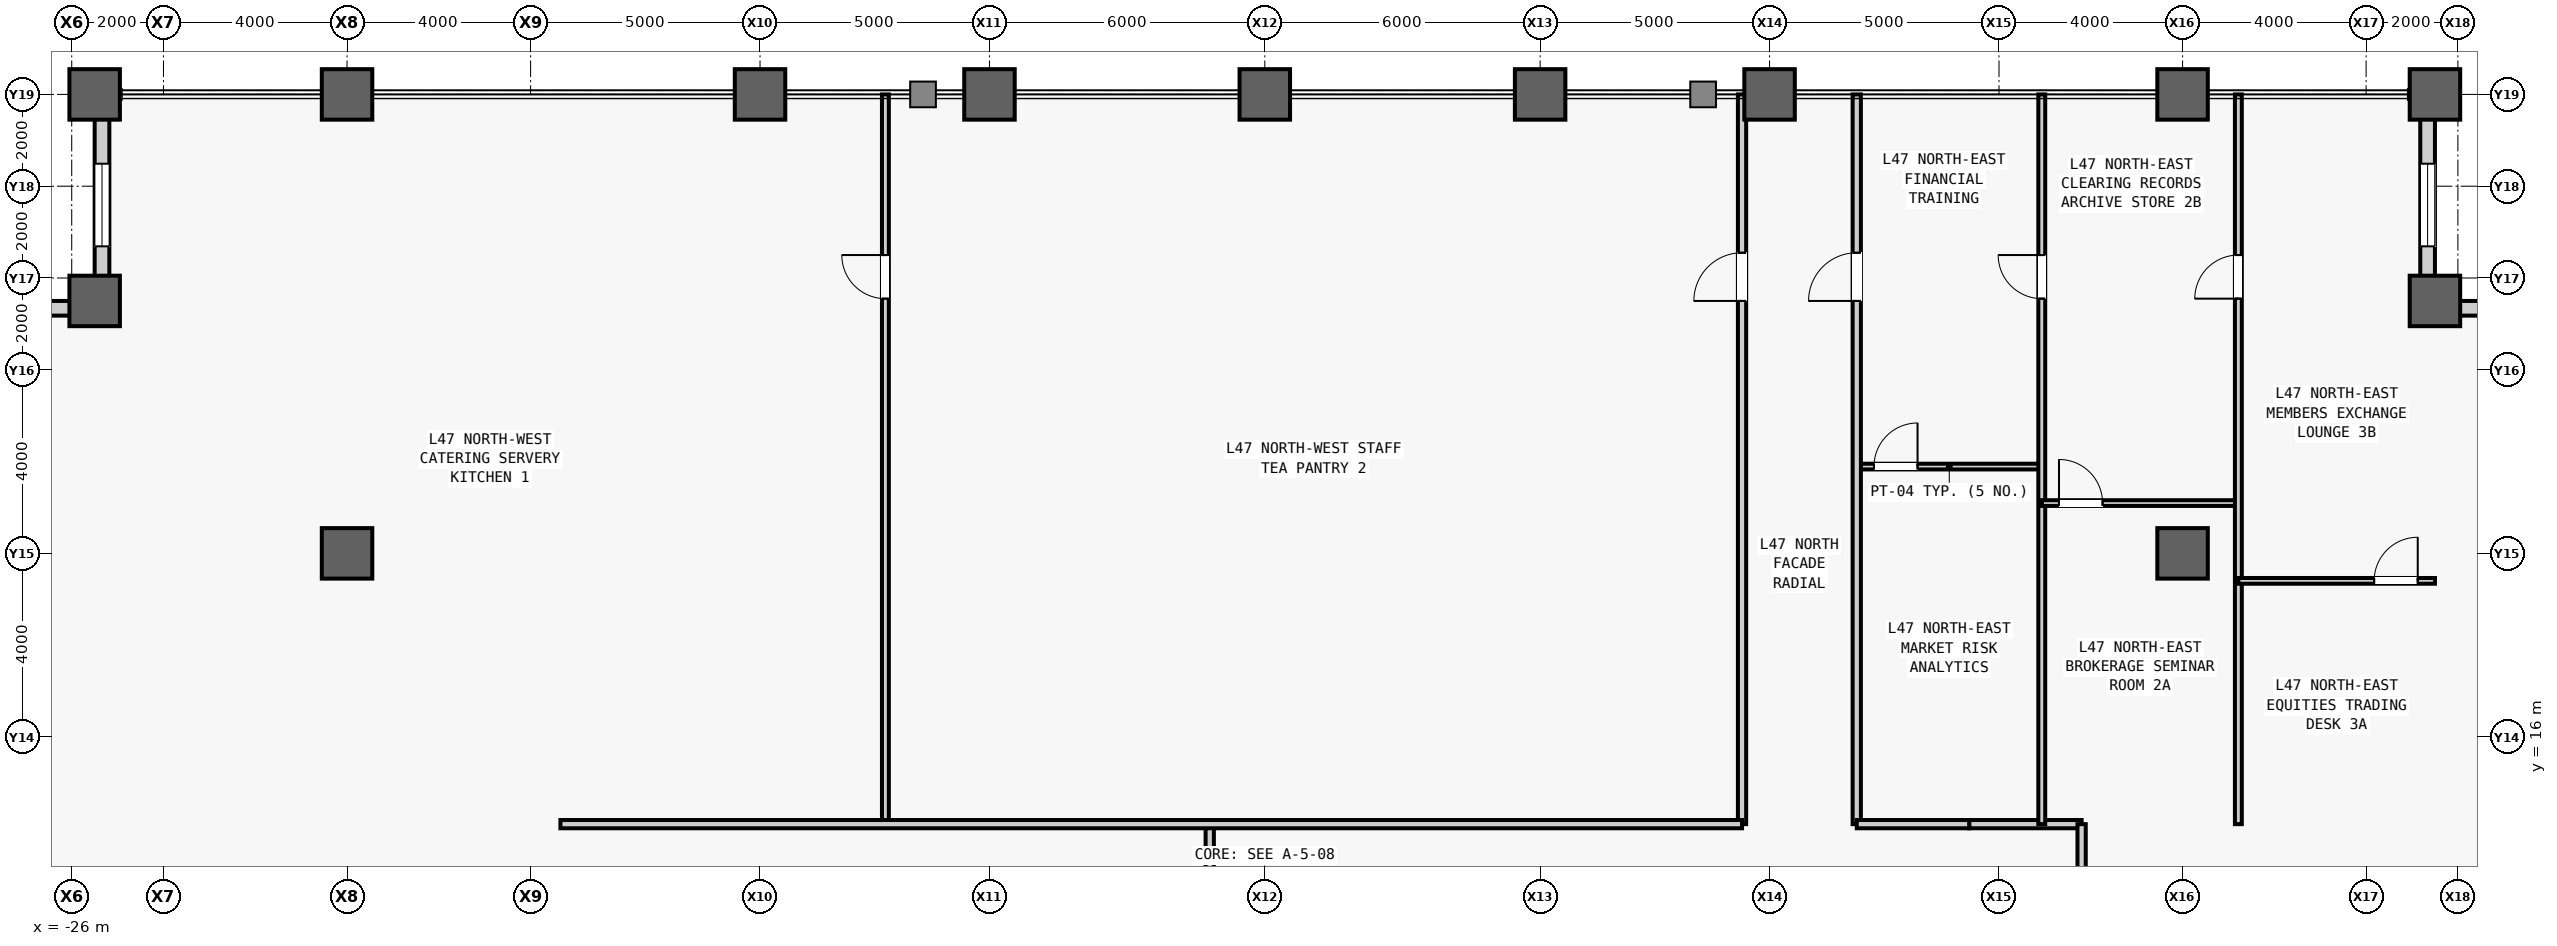
"""IFC4 building model, lengths in metres.
Left out: names, types, materials, properties, quantities, classifications, styles, units other than length and angle.
Written with IfcOpenShell. Run it as: python <this file> out.ifc"""

import sys

from ifc_helpers import new_model, si_unit, direction, frame, frame_2d, origin, origin_2d, place, context, subcontext, project, spatial, rectangle, hollow_rectangle, extrude, source, transform, mapped, element, fill, save


model = new_model("IFC4")
c1 = context("Model", 3, precision=1e-05, world=origin(), true_north=direction((0.0, 1.0)))
c2 = subcontext(c1, "Body", "Model", "MODEL_VIEW")
j1 = project(units=[si_unit("LENGTHUNIT", "METRE"), si_unit("PLANEANGLEUNIT", "RADIAN")], contexts=[c1])
p1 = place(None, origin())
s1 = spatial("IfcSite", under=j1, at=p1, CompositionType="ELEMENT")
p2 = place(p1, origin())
s2 = spatial("IfcBuilding", under=s1, at=p2, CompositionType="ELEMENT")
p3 = place(p2, frame((0.0, 0.0, 203.1)))
s3 = spatial("IfcBuildingStorey", under=s2, at=p3, CompositionType="ELEMENT", Elevation=203.1)
m1 = source(origin(), c2, "Body", "SweptSolid", [
    extrude(hollow_rectangle(XDim=1.1, YDim=1.1, WallThickness=0.06, at=origin_2d()), origin(), (0.0, 0.0, 1.0), 4.0),
])
for number, where, z_axis, x_axis in (
    (1, (-25.5, 25.5, 0.0), (0.0, 0.0, 1.0), (1.0, 0.0, 0.0)),
    (2, (-25.5, 30.0, 0.0), (0.0, 0.0, 1.0), (1.0, 0.0, 0.0)),
    (3, (-20.0, 20.0, 0.0), (0.0, 0.0, 1.0), (1.0, 0.0, 0.0)),
    (4, (-20.0, 30.0, 0.0), (0.0, 0.0, 1.0), (1.0, 0.0, 0.0)),
    (5, (-11.0, 30.0, 0.0), (0.0, 0.0, 1.0), (1.0, 0.0, 0.0)),
    (6, (-6.0, 30.0, 0.0), (0.0, 0.0, 1.0), (1.0, 0.0, 0.0)),
    (7, (0.0, 30.0, 0.0), (0.0, 0.0, 1.0), (1.0, 0.0, 0.0)),
    (8, (6.0, 30.0, 0.0), (0.0, 0.0, 1.0), (1.0, 0.0, 0.0)),
    (9, (11.0, 30.0, 0.0), (0.0, 0.0, 1.0), (1.0, 0.0, 0.0)),
    (10, (20.0, 20.0, 0.0), (0.0, 0.0, 1.0), (1.0, 0.0, 0.0)),
    (11, (20.0, 30.0, 0.0), (0.0, 0.0, 1.0), (1.0, 0.0, 0.0)),
    (12, (25.5, 25.5, 0.0), (0.0, 0.0, 1.0), (1.0, 0.0, 0.0)),
    (13, (25.5, 30.0, 0.0), (0.0, 0.0, 1.0), (1.0, 0.0, 0.0)),
):
    element("IfcColumn", number, at=place(p3, frame(where, z_axis=z_axis, x_axis=x_axis)), inside=s3, PredefinedType="COLUMN", context=c2, shape_type="MappedRepresentation", body=[
        mapped(m1, transform((0.0, 0.0, 0.0), scale=1.0)),
    ])
m2 = source(origin(), c2, "Body", "SweptSolid", [
    extrude(rectangle(XDim=4.18, YDim=0.32, at=frame_2d((2.09, 0.0))), origin(), (0.0, 0.0, 1.0), 3.164),
])
p4 = place(p3, frame((25.5, 25.34, 0.0), z_axis=(0.0, 0.0, 1.0), x_axis=(1.0, 0.0, 0.0)))
e14 = element("IfcWall", 14, at=p4, inside=s3, PredefinedType="STANDARD", context=c2, shape_type="MappedRepresentation", body=[
    mapped(m2, transform((0.0, 0.0, 0.0), scale=1.0)),
])
m3 = source(origin(), c2, "Body", "SweptSolid", [
    extrude(rectangle(XDim=1.8, YDim=2.4, at=frame_2d((0.9, 1.2))), frame((0.0, 0.17, 0.0), z_axis=(0.0, -1.0, 0.0), x_axis=(1.0, 0.0, 0.0)), (0.0, 0.0, 1.0), 0.34),
])
p5 = place(p4, frame((1.19, 0.0, 0.5)))
e15 = element("IfcOpeningElement", 15, at=p5, cuts=e14, PredefinedType="OPENING", context=c2, shape_type="MappedRepresentation", body=[
    mapped(m3, transform((0.0, 0.0, 0.0), scale=1.0)),
])
p6 = place(p3, frame((25.34, 25.5, 0.0), z_axis=(0.0, 0.0, 1.0), x_axis=(0.0, 1.0, 0.0)))
e16 = element("IfcWall", 16, at=p6, inside=s3, PredefinedType="STANDARD", context=c2, shape_type="MappedRepresentation", body=[
    mapped(m2, transform((0.0, 0.0, 0.0), scale=1.0)),
])
p7 = place(p6, frame((1.19, 0.0, 0.5)))
e17 = element("IfcOpeningElement", 17, at=p7, cuts=e16, PredefinedType="OPENING", context=c2, shape_type="MappedRepresentation", body=[
    mapped(m3, transform((0.0, 0.0, 0.0), scale=1.0)),
])
p8 = place(p3, frame((-25.34, 25.5, 0.0), z_axis=(0.0, 0.0, 1.0), x_axis=(0.0, 1.0, 0.0)))
e18 = element("IfcWall", 18, at=p8, inside=s3, PredefinedType="STANDARD", context=c2, shape_type="MappedRepresentation", body=[
    mapped(m2, transform((0.0, 0.0, 0.0), scale=1.0)),
])
p9 = place(p8, frame((1.19, 0.0, 0.5)))
e19 = element("IfcOpeningElement", 19, at=p9, cuts=e18, PredefinedType="OPENING", context=c2, shape_type="MappedRepresentation", body=[
    mapped(m3, transform((0.0, 0.0, 0.0), scale=1.0)),
])
p10 = place(p3, frame((-25.5, 25.34, 0.0), z_axis=(0.0, 0.0, 1.0), x_axis=(-1.0, 0.0, 0.0)))
e20 = element("IfcWall", 20, at=p10, inside=s3, PredefinedType="STANDARD", context=c2, shape_type="MappedRepresentation", body=[
    mapped(m2, transform((0.0, 0.0, 0.0), scale=1.0)),
])
p11 = place(p10, frame((1.19, 0.0, 0.5)))
e21 = element("IfcOpeningElement", 21, at=p11, cuts=e20, PredefinedType="OPENING", context=c2, shape_type="MappedRepresentation", body=[
    mapped(m3, transform((0.0, 0.0, 0.0), scale=1.0)),
])
m4 = source(origin(), c2, "Body", "SweptSolid", [
    extrude(rectangle(XDim=2.45, YDim=0.18, at=frame_2d((1.225, 0.0))), origin(), (0.0, 0.0, 1.0), 3.78),
])
p12 = place(p3, frame((15.35, 14.1, 0.0), z_axis=(0.0, 0.0, 1.0), x_axis=(1.0, 0.0, 0.0)))
e22 = element("IfcWall", 22, at=p12, inside=s3, PredefinedType="PARTITIONING", context=c2, shape_type="MappedRepresentation", body=[
    mapped(m4, transform((0.0, 0.0, 0.0), scale=1.0)),
])
m5 = source(origin(), c2, "Body", "SweptSolid", [
    extrude(rectangle(XDim=3.1, YDim=0.18, at=frame_2d((1.55, 0.0))), origin(), (0.0, 0.0, 1.0), 3.78),
])
p13 = place(p3, frame((-1.2, 11.0, 0.0), z_axis=(0.0, 0.0, 1.0), x_axis=(0.0, 1.0, 0.0)))
e23 = element("IfcWall", 23, at=p13, inside=s3, PredefinedType="PARTITIONING", context=c2, shape_type="MappedRepresentation", body=[
    mapped(m5, transform((0.0, 0.0, 0.0), scale=1.0)),
])
m6 = source(origin(), c2, "Body", "SweptSolid", [
    extrude(rectangle(XDim=15.9, YDim=0.15, at=frame_2d((7.95, 0.0))), origin(), (0.0, 0.0, 1.0), 3.78),
])
p14 = place(p3, frame((-8.268, 14.1, 0.0), z_axis=(0.0, 0.0, 1.0), x_axis=(0.0, 1.0, 0.0)))
e24 = element("IfcWall", 24, at=p14, inside=s3, PredefinedType="PARTITIONING", context=c2, shape_type="MappedRepresentation", body=[
    mapped(m6, transform((0.0, 0.0, 0.0), scale=1.0)),
])
m7 = source(origin(), c2, "Body", "SweptSolid", [
    extrude(rectangle(XDim=0.95, YDim=2.15, at=frame_2d((0.475, 1.075))), frame((0.0, 0.085, 0.0), z_axis=(0.0, -1.0, 0.0), x_axis=(1.0, 0.0, 0.0)), (0.0, 0.0, 1.0), 0.17),
])
p15 = place(p14, frame((11.45, 0.0, 0.0)))
e25 = element("IfcOpeningElement", 25, at=p15, cuts=e24, PredefinedType="OPENING", context=c2, shape_type="MappedRepresentation", body=[
    mapped(m7, transform((0.0, 0.0, 0.0), scale=1.0)),
])
m8 = source(origin(), c2, "Body", "SweptSolid", [
    extrude(rectangle(XDim=15.9, YDim=0.18, at=frame_2d((7.95, 0.0))), origin(), (0.0, 0.0, 1.0), 3.78),
])
p16 = place(p3, frame((10.4, 14.1, 0.0), z_axis=(0.0, 0.0, 1.0), x_axis=(0.0, 1.0, 0.0)))
e26 = element("IfcWall", 26, at=p16, inside=s3, PredefinedType="PARTITIONING", context=c2, shape_type="MappedRepresentation", body=[
    mapped(m8, transform((0.0, 0.0, 0.0), scale=1.0)),
])
m9 = source(origin(), c2, "Body", "SweptSolid", [
    extrude(rectangle(XDim=1.05, YDim=2.2, at=frame_2d((0.525, 1.1))), frame((0.0, 0.1, 0.0), z_axis=(0.0, -1.0, 0.0), x_axis=(1.0, 0.0, 0.0)), (0.0, 0.0, 1.0), 0.2),
])
p17 = place(p16, frame((11.4, 0.0, 0.0)))
e27 = element("IfcOpeningElement", 27, at=p17, cuts=e26, PredefinedType="OPENING", context=c2, shape_type="MappedRepresentation", body=[
    mapped(m9, transform((0.0, 0.0, 0.0), scale=1.0)),
])
m10 = source(origin(), c2, "Body", "SweptSolid", [
    extrude(rectangle(XDim=25.75, YDim=0.18, at=frame_2d((12.875, 0.0))), origin(), (0.0, 0.0, 1.0), 3.78),
])
p18 = place(p3, frame((-15.35, 14.1, 0.0), z_axis=(0.0, 0.0, 1.0), x_axis=(1.0, 0.0, 0.0)))
e28 = element("IfcWall", 28, at=p18, inside=s3, PredefinedType="PARTITIONING", context=c2, shape_type="MappedRepresentation", body=[
    mapped(m10, transform((0.0, 0.0, 0.0), scale=1.0)),
])
m11 = source(origin(), c2, "Body", "SweptSolid", [
    extrude(rectangle(XDim=4.032, YDim=0.125, at=frame_2d((2.016, 0.0))), origin(), (0.0, 0.0, 1.0), 3.78),
])
p19 = place(p3, frame((12.9, 21.891, 0.0), z_axis=(0.0, 0.0, 1.0), x_axis=(1.0, 0.0, 0.0)))
e29 = element("IfcWall", 29, at=p19, inside=s3, PredefinedType="PARTITIONING", context=c2, shape_type="MappedRepresentation", body=[
    mapped(m11, transform((0.0, 0.0, 0.0), scale=1.0)),
])
m12 = source(origin(), c2, "Body", "SweptSolid", [
    extrude(rectangle(XDim=0.95, YDim=2.15, at=frame_2d((0.475, 1.075))), frame((0.0, 0.073, 0.0), z_axis=(0.0, -1.0, 0.0), x_axis=(1.0, 0.0, 0.0)), (0.0, 0.0, 1.0), 0.145),
])
p20 = place(p19, frame((0.375, 0.0, 0.0)))
e30 = element("IfcOpeningElement", 30, at=p20, cuts=e29, PredefinedType="OPENING", context=c2, shape_type="MappedRepresentation", body=[
    mapped(m12, transform((0.0, 0.0, 0.0), scale=1.0)),
])
p21 = place(p3, frame((16.932, 14.1, 0.0), z_axis=(0.0, 0.0, 1.0), x_axis=(0.0, 1.0, 0.0)))
e31 = element("IfcWall", 31, at=p21, inside=s3, PredefinedType="PARTITIONING", context=c2, shape_type="MappedRepresentation", body=[
    mapped(m6, transform((0.0, 0.0, 0.0), scale=1.0)),
])
p22 = place(p21, frame((11.45, 0.0, 0.0)))
e32 = element("IfcOpeningElement", 32, at=p22, cuts=e31, PredefinedType="OPENING", context=c2, shape_type="MappedRepresentation", body=[
    mapped(m7, transform((0.0, 0.0, 0.0), scale=1.0)),
])
m13 = source(origin(), c2, "Body", "SweptSolid", [
    extrude(rectangle(XDim=4.284, YDim=0.125, at=frame_2d((2.142, 0.0))), origin(), (0.0, 0.0, 1.0), 3.78),
])
p23 = place(p3, frame((16.932, 21.096, 0.0), z_axis=(0.0, 0.0, 1.0), x_axis=(1.0, 0.0, 0.0)))
e33 = element("IfcWall", 33, at=p23, inside=s3, PredefinedType="PARTITIONING", context=c2, shape_type="MappedRepresentation", body=[
    mapped(m13, transform((0.0, 0.0, 0.0), scale=1.0)),
])
p24 = place(p23, frame((0.375, 0.0, 0.0)))
e34 = element("IfcOpeningElement", 34, at=p24, cuts=e33, PredefinedType="OPENING", context=c2, shape_type="MappedRepresentation", body=[
    mapped(m12, transform((0.0, 0.0, 0.0), scale=1.0)),
])
p25 = place(p3, frame((21.216, 14.1, 0.0), z_axis=(0.0, 0.0, 1.0), x_axis=(0.0, 1.0, 0.0)))
e35 = element("IfcWall", 35, at=p25, inside=s3, PredefinedType="PARTITIONING", context=c2, shape_type="MappedRepresentation", body=[
    mapped(m6, transform((0.0, 0.0, 0.0), scale=1.0)),
])
p26 = place(p25, frame((11.45, 0.0, 0.0)))
e36 = element("IfcOpeningElement", 36, at=p26, cuts=e35, PredefinedType="OPENING", context=c2, shape_type="MappedRepresentation", body=[
    mapped(m7, transform((0.0, 0.0, 0.0), scale=1.0)),
])
m14 = source(origin(), c2, "Body", "SweptSolid", [
    extrude(rectangle(XDim=4.284, YDim=0.125, at=frame_2d((2.142, 0.0))), origin(), (0.0, 0.0, 1.0), 3.363),
])
p27 = place(p3, frame((21.216, 19.401, 0.0), z_axis=(0.0, 0.0, 1.0), x_axis=(1.0, 0.0, 0.0)))
e37 = element("IfcWall", 37, at=p27, inside=s3, PredefinedType="PARTITIONING", context=c2, shape_type="MappedRepresentation", body=[
    mapped(m14, transform((0.0, 0.0, 0.0), scale=1.0)),
])
p28 = place(p27, frame((2.959, 0.0, 0.0)))
e38 = element("IfcOpeningElement", 38, at=p28, cuts=e37, PredefinedType="OPENING", context=c2, shape_type="MappedRepresentation", body=[
    mapped(m12, transform((0.0, 0.0, 0.0), scale=1.0)),
])
p29 = place(p3, frame((12.9, 14.1, 0.0), z_axis=(0.0, 0.0, 1.0), x_axis=(0.0, 1.0, 0.0)))
e39 = element("IfcWall", 39, at=p29, inside=s3, PredefinedType="PARTITIONING", context=c2, shape_type="MappedRepresentation", body=[
    mapped(m8, transform((0.0, 0.0, 0.0), scale=1.0)),
])
p30 = place(p29, frame((11.4, 0.0, 0.0)))
e40 = element("IfcOpeningElement", 40, at=p30, cuts=e39, PredefinedType="OPENING", context=c2, shape_type="MappedRepresentation", body=[
    mapped(m9, transform((0.0, 0.0, 0.0), scale=1.0)),
])
m15 = source(origin(), c2, "Body", "SweptSolid", [
    extrude(rectangle(XDim=2.45, YDim=0.18, at=frame_2d((1.225, 0.0))), origin(), (0.0, 0.0, 1.0), 3.78),
])
p31 = place(p3, frame((12.9, 14.1, 0.0), z_axis=(0.0, 0.0, 1.0), x_axis=(1.0, 0.0, 0.0)))
e41 = element("IfcWall", 41, at=p31, inside=s3, PredefinedType="PARTITIONING", context=c2, shape_type="MappedRepresentation", body=[
    mapped(m15, transform((0.0, 0.0, 0.0), scale=1.0)),
])
m16 = source(origin(), c2, "Body", "SweptSolid", [
    extrude(rectangle(XDim=10.0, YDim=0.18, at=frame_2d((5.0, 0.0))), origin(), (0.0, 0.0, 1.0), 3.78),
])
p32 = place(p3, frame((17.8, 4.1, 0.0), z_axis=(0.0, 0.0, 1.0), x_axis=(0.0, 1.0, 0.0)))
e42 = element("IfcWall", 42, at=p32, inside=s3, PredefinedType="PARTITIONING", context=c2, shape_type="MappedRepresentation", body=[
    mapped(m16, transform((0.0, 0.0, 0.0), scale=1.0)),
])
m17 = source(origin(), c2, "Body", "SweptSolid", [
    extrude(rectangle(XDim=1.8, YDim=2.4, at=frame_2d((0.9, 1.2))), frame((0.0, 0.03, 0.0), z_axis=(0.0, -1.0, 0.0), x_axis=(1.0, 0.0, 0.0)), (0.0, 0.0, 1.0), 0.06),
])
p33 = place(p7, origin())
e43 = element("IfcWindow", 43, at=p33, inside=s3, PartitioningType="SINGLE_PANEL", PredefinedType="WINDOW", context=c2, shape_type="MappedRepresentation", body=[
    mapped(m17, transform((0.0, 0.0, 0.0), scale=1.0)),
])
fill(e17, e43)
p34 = place(p9, origin())
e44 = element("IfcWindow", 44, at=p34, inside=s3, PartitioningType="SINGLE_PANEL", PredefinedType="WINDOW", context=c2, shape_type="MappedRepresentation", body=[
    mapped(m17, transform((0.0, 0.0, 0.0), scale=1.0)),
])
fill(e19, e44)
m18 = source(origin(), c2, "Body", "SweptSolid", [
    extrude(rectangle(XDim=0.95, YDim=2.15, at=frame_2d((0.475, 1.075))), frame((0.0, 0.025, 0.0), z_axis=(0.0, -1.0, 0.0), x_axis=(1.0, 0.0, 0.0)), (0.0, 0.0, 1.0), 0.05),
])
p35 = place(p15, origin())
e45 = element("IfcDoor", 45, at=p35, inside=s3, OperationType="SINGLE_SWING_RIGHT", PredefinedType="DOOR", context=c2, shape_type="MappedRepresentation", body=[
    mapped(m18, transform((0.0, 0.0, 0.0), scale=1.0)),
])
fill(e25, e45)
m19 = source(origin(), c2, "Body", "SweptSolid", [
    extrude(rectangle(XDim=1.05, YDim=2.2, at=frame_2d((0.525, 1.1))), frame((0.0, 0.025, 0.0), z_axis=(0.0, -1.0, 0.0), x_axis=(1.0, 0.0, 0.0)), (0.0, 0.0, 1.0), 0.05),
])
p36 = place(p17, origin())
e46 = element("IfcDoor", 46, at=p36, inside=s3, OperationType="SINGLE_SWING_LEFT", PredefinedType="DOOR", context=c2, shape_type="MappedRepresentation", body=[
    mapped(m19, transform((0.0, 0.0, 0.0), scale=1.0)),
])
fill(e27, e46)
p37 = place(p20, origin())
e47 = element("IfcDoor", 47, at=p37, inside=s3, OperationType="SINGLE_SWING_RIGHT", PredefinedType="DOOR", context=c2, shape_type="MappedRepresentation", body=[
    mapped(m18, transform((0.0, 0.0, 0.0), scale=1.0)),
])
fill(e30, e47)
p38 = place(p22, origin())
e48 = element("IfcDoor", 48, at=p38, inside=s3, OperationType="SINGLE_SWING_RIGHT", PredefinedType="DOOR", context=c2, shape_type="MappedRepresentation", body=[
    mapped(m18, transform((0.0, 0.0, 0.0), scale=1.0)),
])
fill(e32, e48)
p39 = place(p24, origin())
e49 = element("IfcDoor", 49, at=p39, inside=s3, OperationType="SINGLE_SWING_LEFT", PredefinedType="DOOR", context=c2, shape_type="MappedRepresentation", body=[
    mapped(m18, transform((0.0, 0.0, 0.0), scale=1.0)),
])
fill(e34, e49)
p40 = place(p26, origin())
e50 = element("IfcDoor", 50, at=p40, inside=s3, OperationType="SINGLE_SWING_LEFT", PredefinedType="DOOR", context=c2, shape_type="MappedRepresentation", body=[
    mapped(m18, transform((0.0, 0.0, 0.0), scale=1.0)),
])
fill(e36, e50)
p41 = place(p28, origin())
e51 = element("IfcDoor", 51, at=p41, inside=s3, OperationType="SINGLE_SWING_RIGHT", PredefinedType="DOOR", context=c2, shape_type="MappedRepresentation", body=[
    mapped(m18, transform((0.0, 0.0, 0.0), scale=1.0)),
])
fill(e38, e51)
p42 = place(p30, origin())
e52 = element("IfcDoor", 52, at=p42, inside=s3, OperationType="SINGLE_SWING_LEFT", PredefinedType="DOOR", context=c2, shape_type="MappedRepresentation", body=[
    mapped(m19, transform((0.0, 0.0, 0.0), scale=1.0)),
])
fill(e40, e52)
save(model, sys.argv[1])
